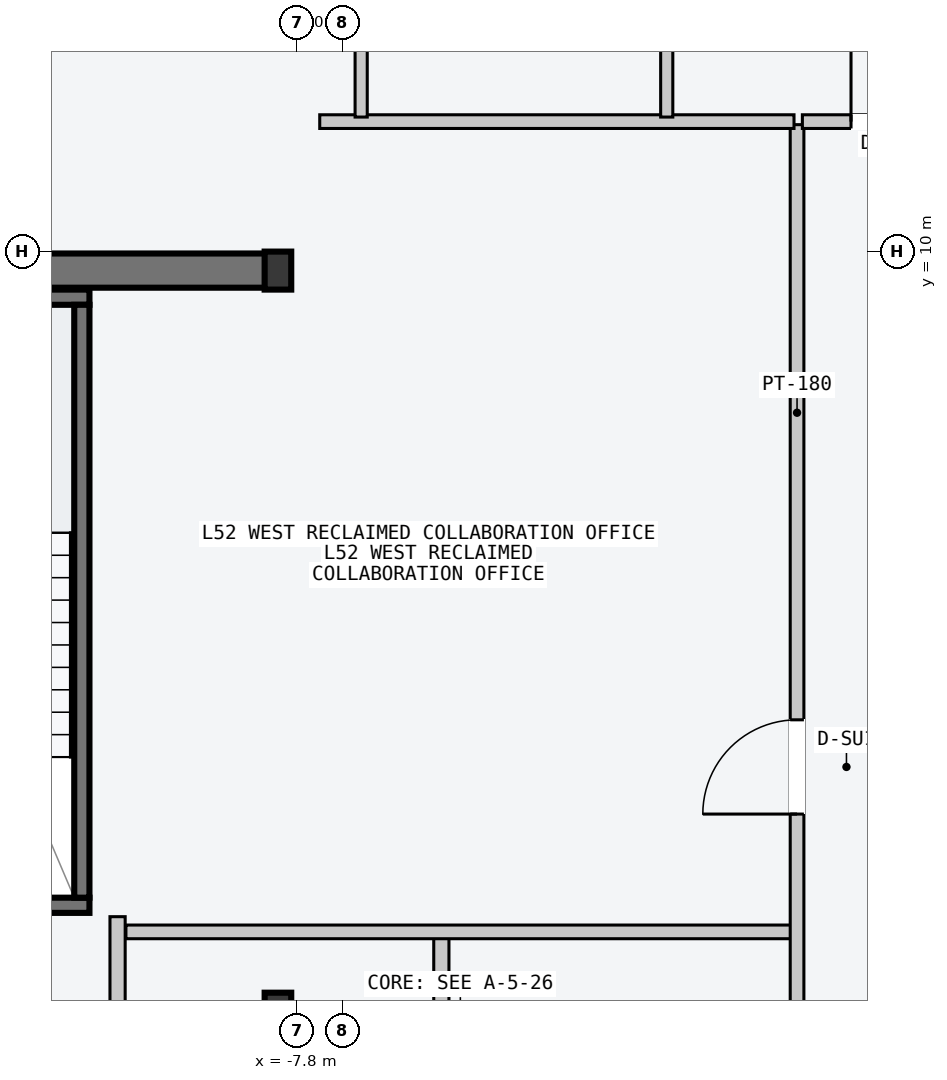
"""IFC4 building model, lengths in metres.
Left out: names, types, materials, properties, quantities, classifications, styles, units other than length and angle.
Written with IfcOpenShell. Run it as: python <this file> out.ifc"""

import sys

from ifc_helpers import new_model, si_unit, direction, frame, frame_2d, origin, origin_2d, place, context, subcontext, project, spatial, rectangle, i_section, extrude, element, fill, save


model = new_model("IFC4")
c1 = context("Model", 3, precision=1e-05, world=origin(), true_north=direction((0.0, 1.0)))
c2 = subcontext(c1, "Body", "Model", "MODEL_VIEW")
j1 = project(units=[si_unit("LENGTHUNIT", "METRE"), si_unit("PLANEANGLEUNIT", "RADIAN")], contexts=[c1])
p1 = place(None, origin())
s1 = spatial("IfcSite", under=j1, at=p1, CompositionType="ELEMENT")
p2 = place(p1, origin())
s2 = spatial("IfcBuilding", under=s1, at=p2, CompositionType="ELEMENT")
p3 = place(p2, frame((0.0, 0.0, 198.3)))
s3 = spatial("IfcBuildingStorey", under=s2, at=p3, CompositionType="ELEMENT", Elevation=198.3)
p4 = place(p3, frame((-14.53, 9.75, -0.2), z_axis=(0.0, 0.0, 1.0), x_axis=(1.0, 0.0, 0.0)))
e1 = element("IfcWall", 1, at=p4, inside=s3, PredefinedType="SHEAR", context=c2, shape_type="SweptSolid", body=[
    extrude(rectangle(XDim=6.46, YDim=0.45, at=frame_2d((3.23, 0.0))), origin(), (0.0, 0.0, 1.0), 3.6),
])
p5 = place(p3, frame((-14.25, 1.4, -0.2), z_axis=(0.0, 0.0, 1.0), x_axis=(1.0, 0.0, 0.0)))
e2 = element("IfcWall", 2, at=p5, inside=s3, PredefinedType="SOLIDWALL", context=c2, shape_type="SweptSolid", body=[
    extrude(rectangle(XDim=3.72, YDim=0.2, at=frame_2d((1.86, 0.0))), origin(), (0.0, 0.0, 1.0), 3.6),
])
p6 = place(p5, frame((1.5, 0.0, 0.2)))
e3 = element("IfcOpeningElement", 3, at=p6, cuts=e2, PredefinedType="OPENING", context=c2, shape_type="SweptSolid", body=[
    extrude(rectangle(XDim=1.12, YDim=2.18, at=frame_2d((0.56, 1.09))), frame((0.0, 0.11, 0.0), z_axis=(0.0, -1.0, 0.0), x_axis=(1.0, 0.0, 0.0)), (0.0, 0.0, 1.0), 0.22),
])
p7 = place(p3, frame((-14.25, 9.4, -0.2), z_axis=(0.0, 0.0, 1.0), x_axis=(1.0, 0.0, 0.0)))
e4 = element("IfcWall", 4, at=p7, inside=s3, PredefinedType="SOLIDWALL", context=c2, shape_type="SweptSolid", body=[
    extrude(rectangle(XDim=3.72, YDim=0.2, at=frame_2d((1.86, 0.0))), origin(), (0.0, 0.0, 1.0), 3.6),
])
p8 = place(p3, frame((-10.63, 1.5, -0.2), z_axis=(0.0, 0.0, 1.0), x_axis=(0.0, 1.0, 0.0)))
e5 = element("IfcWall", 5, at=p8, inside=s3, PredefinedType="SOLIDWALL", context=c2, shape_type="SweptSolid", body=[
    extrude(rectangle(XDim=7.8, YDim=0.2, at=frame_2d((3.9, 0.0))), origin(), (0.0, 0.0, 1.0), 3.6),
])
for number, where, z_axis, x_axis in (
    (6, (-8.05, 0.0, 0.0), (0.0, 0.0, 1.0), (1.0, 0.0, 0.0)),
    (7, (-8.05, 9.75, 0.0), (0.0, 0.0, 1.0), (1.0, 0.0, 0.0)),
):
    element("IfcColumn", number, at=place(p3, frame(where, z_axis=z_axis, x_axis=x_axis)), inside=s3, PredefinedType="COLUMN", context=c2, shape_type="SweptSolid", body=[
        extrude(i_section(OverallWidth=0.35, OverallDepth=0.5, WebThickness=0.02, FlangeThickness=0.032, at=origin_2d()), origin(), (0.0, 0.0, 1.0), 3.6),
    ])
p9 = place(p3, frame((-5.9, -9.45, 0.0), z_axis=(0.0, 0.0, 1.0), x_axis=(0.0, 1.0, 0.0)))
e8 = element("IfcWall", 8, at=p9, inside=s3, PredefinedType="PARTITIONING", context=c2, shape_type="SweptSolid", body=[
    extrude(rectangle(XDim=10.5, YDim=0.2, at=frame_2d((5.25, 0.0))), origin(), (0.0, 0.0, 1.0), 3.4),
])
p10 = place(p9, frame((3.9, 0.0, 0.0)))
e9 = element("IfcOpeningElement", 9, at=p10, cuts=e8, PredefinedType="OPENING", context=c2, shape_type="SweptSolid", body=[
    extrude(rectangle(XDim=1.5, YDim=2.2, at=frame_2d((0.75, 1.1))), frame((0.0, 0.11, 0.0), z_axis=(0.0, -1.0, 0.0), x_axis=(1.0, 0.0, 0.0)), (0.0, 0.0, 1.0), 0.22),
])
p11 = place(p3, frame((-10.16, -2.55, 0.0), z_axis=(0.0, 0.0, 1.0), x_axis=(0.0, 1.0, 0.0)))
e10 = element("IfcWall", 10, at=p11, inside=s3, PredefinedType="PARTITIONING", context=c2, shape_type="SweptSolid", body=[
    extrude(rectangle(XDim=3.8, YDim=0.2, at=frame_2d((1.9, 0.0))), origin(), (0.0, 0.0, 1.0), 3.4),
])
p12 = place(p11, frame((1.3, 0.0, 0.0)))
e11 = element("IfcOpeningElement", 11, at=p12, cuts=e10, PredefinedType="OPENING", context=c2, shape_type="SweptSolid", body=[
    extrude(rectangle(XDim=1.1, YDim=2.15, at=frame_2d((0.55, 1.075))), frame((0.0, 0.11, 0.0), z_axis=(0.0, -1.0, 0.0), x_axis=(1.0, 0.0, 0.0)), (0.0, 0.0, 1.0), 0.22),
])
p13 = place(p3, frame((-10.05, 1.05, 0.0), z_axis=(0.0, 0.0, 1.0), x_axis=(1.0, 0.0, 0.0)))
e12 = element("IfcWall", 12, at=p13, inside=s3, PredefinedType="PARTITIONING", context=c2, shape_type="SweptSolid", body=[
    extrude(rectangle(XDim=8.79, YDim=0.18, at=frame_2d((4.395, 0.0))), origin(), (0.0, 0.0, 1.0), 3.4),
])
p14 = place(p3, frame((-1.22, -3.5, 0.0), z_axis=(0.0, 0.0, 1.0), x_axis=(0.0, 1.0, 0.0)))
e13 = element("IfcWall", 13, at=p14, inside=s3, PredefinedType="PARTITIONING", context=c2, shape_type="SweptSolid", body=[
    extrude(rectangle(XDim=15.17, YDim=0.18, at=frame_2d((7.585, 0.0))), origin(), (0.0, 0.0, 1.0), 3.4),
])
p15 = place(p14, frame((6.1, 0.0, 0.0)))
e14 = element("IfcOpeningElement", 14, at=p15, cuts=e13, PredefinedType="OPENING", context=c2, shape_type="SweptSolid", body=[
    extrude(rectangle(XDim=1.24, YDim=2.24, at=frame_2d((0.62, 1.12))), frame((0.0, 0.1, 0.0), z_axis=(0.0, -1.0, 0.0), x_axis=(1.0, 0.0, 0.0)), (0.0, 0.0, 1.0), 0.2),
])
p16 = place(p14, frame((1.6, 0.0, 0.0)))
e15 = element("IfcOpeningElement", 15, at=p16, cuts=e13, PredefinedType="OPENING", context=c2, shape_type="SweptSolid", body=[
    extrude(rectangle(XDim=0.96, YDim=2.18, at=frame_2d((0.48, 1.09))), frame((0.0, 0.1, 0.0), z_axis=(0.0, -1.0, 0.0), x_axis=(1.0, 0.0, 0.0)), (0.0, 0.0, 1.0), 0.2),
])
p17 = place(p3, frame((-7.5, 11.71, 0.0), z_axis=(0.0, 0.0, 1.0), x_axis=(1.0, 0.0, 0.0)))
e16 = element("IfcWall", 16, at=p17, inside=s3, PredefinedType="PARTITIONING", context=c2, shape_type="SweptSolid", body=[
    extrude(rectangle(XDim=6.24, YDim=0.18, at=frame_2d((3.12, 0.0))), origin(), (0.0, 0.0, 1.0), 3.4),
])
p18 = place(p3, frame((-6.955, 11.77, 0.0), z_axis=(0.0, 0.0, 1.0), x_axis=(0.0, 1.0, 0.0)))
e17 = element("IfcWall", 17, at=p18, inside=s3, PredefinedType="PARTITIONING", context=c2, shape_type="SweptSolid", body=[
    extrude(rectangle(XDim=6.79, YDim=0.16, at=frame_2d((3.395, 0.0))), origin(), (0.0, 0.0, 1.0), 3.4),
])
p19 = place(p18, frame((1.15, 0.0, 0.0)))
e18 = element("IfcOpeningElement", 18, at=p19, cuts=e17, PredefinedType="OPENING", context=c2, shape_type="SweptSolid", body=[
    extrude(rectangle(XDim=0.96, YDim=2.18, at=frame_2d((0.48, 1.09))), frame((0.0, 0.09, 0.0), z_axis=(0.0, -1.0, 0.0), x_axis=(1.0, 0.0, 0.0)), (0.0, 0.0, 1.0), 0.18),
])
p20 = place(p3, frame((-2.935, 11.77, 0.0), z_axis=(0.0, 0.0, 1.0), x_axis=(0.0, 1.0, 0.0)))
e19 = element("IfcWall", 19, at=p20, inside=s3, PredefinedType="PARTITIONING", context=c2, shape_type="SweptSolid", body=[
    extrude(rectangle(XDim=6.79, YDim=0.16, at=frame_2d((3.395, 0.0))), origin(), (0.0, 0.0, 1.0), 3.4),
])
p21 = place(p20, frame((1.15, 0.0, 0.0)))
e20 = element("IfcOpeningElement", 20, at=p21, cuts=e19, PredefinedType="OPENING", context=c2, shape_type="SweptSolid", body=[
    extrude(rectangle(XDim=0.96, YDim=2.18, at=frame_2d((0.48, 1.09))), frame((0.0, 0.09, 0.0), z_axis=(0.0, -1.0, 0.0), x_axis=(1.0, 0.0, 0.0)), (0.0, 0.0, 1.0), 0.18),
])
p22 = place(p3, frame((-1.15, 11.71, 0.0), z_axis=(0.0, 0.0, 1.0), x_axis=(1.0, 0.0, 0.0)))
e21 = element("IfcWall", 21, at=p22, inside=s3, PredefinedType="PARTITIONING", context=c2, shape_type="SweptSolid", body=[
    extrude(rectangle(XDim=2.3, YDim=0.18, at=frame_2d((1.15, 0.0))), origin(), (0.0, 0.0, 1.0), 3.4),
])
p23 = place(p22, frame((0.64, 0.0, 0.0)))
e22 = element("IfcOpeningElement", 22, at=p23, cuts=e21, PredefinedType="OPENING", context=c2, shape_type="SweptSolid", body=[
    extrude(rectangle(XDim=1.02, YDim=2.2, at=frame_2d((0.51, 1.1))), frame((0.0, 0.1, 0.0), z_axis=(0.0, -1.0, 0.0), x_axis=(1.0, 0.0, 0.0)), (0.0, 0.0, 1.0), 0.2),
])
p24 = place(p15, origin())
e23 = element("IfcDoor", 23, at=p24, inside=s3, OperationType="SINGLE_SWING_LEFT", PredefinedType="DOOR", context=c2, shape_type="SweptSolid", body=[
    extrude(rectangle(XDim=1.24, YDim=2.24, at=frame_2d((0.62, 1.12))), frame((0.0, 0.025, 0.0), z_axis=(0.0, -1.0, 0.0), x_axis=(1.0, 0.0, 0.0)), (0.0, 0.0, 1.0), 0.05),
])
fill(e14, e23)
p25 = place(p23, origin())
e24 = element("IfcDoor", 24, at=p25, inside=s3, OperationType="SINGLE_SWING_LEFT", PredefinedType="DOOR", context=c2, shape_type="SweptSolid", body=[
    extrude(rectangle(XDim=1.02, YDim=2.2, at=frame_2d((0.51, 1.1))), frame((0.0, 0.025, 0.0), z_axis=(0.0, -1.0, 0.0), x_axis=(1.0, 0.0, 0.0)), (0.0, 0.0, 1.0), 0.05),
])
fill(e22, e24)
save(model, sys.argv[1])
